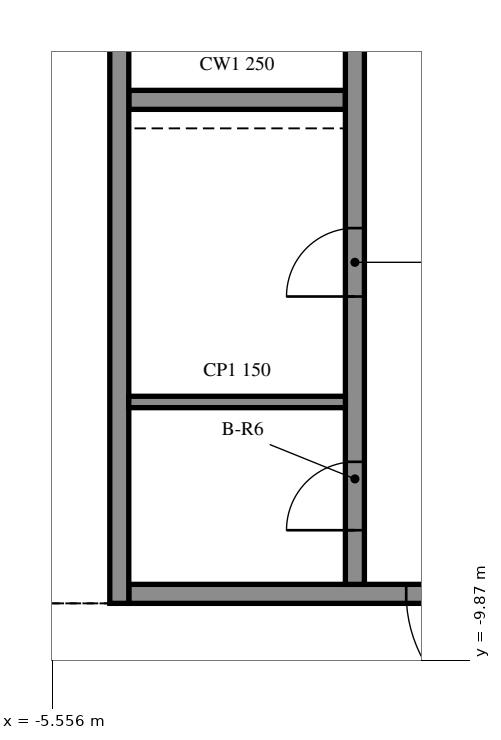
"""IFC4 building model, lengths in metres.
Left out: names, types, materials, properties, quantities, classifications, styles, units other than length and angle.
Written with IfcOpenShell. Run it as: python <this file> out.ifc"""

import sys

from ifc_helpers import new_model, si_unit, direction, frame, frame_2d, origin, place, context, subcontext, project, spatial, rectangle, extrude, element, fill, save


model = new_model("IFC4")
c1 = context("Model", 3, precision=1e-05, world=origin(), true_north=direction((0.0, 1.0)))
c2 = subcontext(c1, "Body", "Model", "MODEL_VIEW")
j1 = project(units=[si_unit("LENGTHUNIT", "METRE"), si_unit("PLANEANGLEUNIT", "RADIAN")], contexts=[c1])
p1 = place(None, origin())
s1 = spatial("IfcSite", under=j1, at=p1, CompositionType="ELEMENT")
p2 = place(p1, origin())
s2 = spatial("IfcBuilding", under=s1, at=p2, CompositionType="ELEMENT")
p3 = place(p2, frame((0.0, 0.0, 117.6)))
s3 = spatial("IfcBuildingStorey", under=s2, at=p3, CompositionType="ELEMENT", Elevation=117.6)
p4 = place(p3, frame((-4.675, 15.125, 0.0), z_axis=(0.0, 0.0, 1.0), x_axis=(0.0, -1.0, 0.0)))
e1 = element("IfcWall", 1, at=p4, inside=s3, PredefinedType="SOLIDWALL", context=c2, shape_type="SweptSolid", body=[
    extrude(rectangle(XDim=24.25, YDim=0.25, at=frame_2d((12.125, 0.0))), origin(), (0.0, 0.0, 1.0), 4.06),
])
p5 = place(p3, frame((4.55, -9.0, 0.0), z_axis=(0.0, 0.0, 1.0), x_axis=(-1.0, 0.0, 0.0)))
e2 = element("IfcWall", 2, at=p5, inside=s3, PredefinedType="SOLIDWALL", context=c2, shape_type="SweptSolid", body=[
    extrude(rectangle(XDim=9.1, YDim=0.25, at=frame_2d((4.55, 0.0))), origin(), (0.0, 0.0, 1.0), 4.06),
])
p6 = place(p5, frame((3.65, 0.0, 0.0)))
e3 = element("IfcOpeningElement", 3, at=p6, cuts=e2, PredefinedType="OPENING", context=c2, shape_type="SweptSolid", body=[
    extrude(rectangle(XDim=1.8, YDim=2.1, at=frame_2d((0.9, 1.05))), frame((0.0, 0.135, 0.0), z_axis=(0.0, -1.0, 0.0), x_axis=(1.0, 0.0, 0.0)), (0.0, 0.0, 1.0), 0.27),
])
p7 = place(p3, frame((-1.575, -8.875, 0.0), z_axis=(0.0, 0.0, 1.0), x_axis=(0.0, 1.0, 0.0)))
e4 = element("IfcWall", 4, at=p7, inside=s3, PredefinedType="SOLIDWALL", context=c2, shape_type="SweptSolid", body=[
    extrude(rectangle(XDim=23.75, YDim=0.25, at=frame_2d((11.875, 0.0))), origin(), (0.0, 0.0, 1.0), 4.06),
])
p8 = place(p7, frame((8.7, 0.0, 0.0)))
e5 = element("IfcOpeningElement", 5, at=p8, cuts=e4, PredefinedType="OPENING", context=c2, shape_type="SweptSolid", body=[
    extrude(rectangle(XDim=0.9, YDim=2.1, at=frame_2d((0.45, 1.05))), frame((0.0, 0.135, 0.0), z_axis=(0.0, -1.0, 0.0), x_axis=(1.0, 0.0, 0.0)), (0.0, 0.0, 1.0), 0.27),
])
p9 = place(p7, frame((14.15, 0.0, 0.0)))
e6 = element("IfcOpeningElement", 6, at=p9, cuts=e4, PredefinedType="OPENING", context=c2, shape_type="SweptSolid", body=[
    extrude(rectangle(XDim=0.9, YDim=2.1, at=frame_2d((0.45, 1.05))), frame((0.0, 0.135, 0.0), z_axis=(0.0, -1.0, 0.0), x_axis=(1.0, 0.0, 0.0)), (0.0, 0.0, 1.0), 0.27),
])
p10 = place(p7, frame((0.712, 0.0, 0.0)))
e7 = element("IfcOpeningElement", 7, at=p10, cuts=e4, PredefinedType="OPENING", context=c2, shape_type="SweptSolid", body=[
    extrude(rectangle(XDim=0.9, YDim=2.1, at=frame_2d((0.45, 1.05))), frame((0.0, 0.135, 0.0), z_axis=(0.0, -1.0, 0.0), x_axis=(1.0, 0.0, 0.0)), (0.0, 0.0, 1.0), 0.27),
])
p11 = place(p7, frame((3.788, 0.0, 0.0)))
e8 = element("IfcOpeningElement", 8, at=p11, cuts=e4, PredefinedType="OPENING", context=c2, shape_type="SweptSolid", body=[
    extrude(rectangle(XDim=0.9, YDim=2.1, at=frame_2d((0.45, 1.05))), frame((0.0, 0.135, 0.0), z_axis=(0.0, -1.0, 0.0), x_axis=(1.0, 0.0, 0.0)), (0.0, 0.0, 1.0), 0.27),
])
p12 = place(p7, frame((20.3, 0.0, 0.0)))
e9 = element("IfcOpeningElement", 9, at=p12, cuts=e4, PredefinedType="OPENING", context=c2, shape_type="SweptSolid", body=[
    extrude(rectangle(XDim=0.9, YDim=2.1, at=frame_2d((0.45, 1.05))), frame((0.0, 0.135, 0.0), z_axis=(0.0, -1.0, 0.0), x_axis=(1.0, 0.0, 0.0)), (0.0, 0.0, 1.0), 0.27),
])
p13 = place(p3, frame((-4.55, -2.5, 0.0), z_axis=(0.0, 0.0, 1.0), x_axis=(1.0, 0.0, 0.0)))
e10 = element("IfcWall", 10, at=p13, inside=s3, PredefinedType="SOLIDWALL", context=c2, shape_type="SweptSolid", body=[
    extrude(rectangle(XDim=2.85, YDim=0.25, at=frame_2d((1.425, 0.0))), origin(), (0.0, 0.0, 1.0), 4.06),
])
p14 = place(p3, frame((-4.55, -6.475, 0.0), z_axis=(0.0, 0.0, 1.0), x_axis=(1.0, 0.0, 0.0)))
e11 = element("IfcWall", 11, at=p14, inside=s3, PredefinedType="PARTITIONING", context=c2, shape_type="SweptSolid", body=[
    extrude(rectangle(XDim=2.85, YDim=0.15, at=frame_2d((1.425, 0.0))), origin(), (0.0, 0.0, 1.0), 4.06),
])
p15 = place(p6, origin())
e12 = element("IfcDoor", 12, at=p15, inside=s3, OperationType="DOUBLE_DOOR_SINGLE_SWING", PredefinedType="DOOR", context=c2, shape_type="SweptSolid", body=[
    extrude(rectangle(XDim=1.8, YDim=2.1, at=frame_2d((0.9, 1.05))), frame((0.0, 0.025, 0.0), z_axis=(0.0, -1.0, 0.0), x_axis=(1.0, 0.0, 0.0)), (0.0, 0.0, 1.0), 0.05),
])
fill(e3, e12)
p16 = place(p10, origin())
e13 = element("IfcDoor", 13, at=p16, inside=s3, OperationType="SINGLE_SWING_RIGHT", PredefinedType="DOOR", context=c2, shape_type="SweptSolid", body=[
    extrude(rectangle(XDim=0.9, YDim=2.1, at=frame_2d((0.45, 1.05))), frame((0.0, 0.025, 0.0), z_axis=(0.0, -1.0, 0.0), x_axis=(1.0, 0.0, 0.0)), (0.0, 0.0, 1.0), 0.05),
])
fill(e7, e13)
p17 = place(p11, origin())
e14 = element("IfcDoor", 14, at=p17, inside=s3, OperationType="SINGLE_SWING_LEFT", PredefinedType="DOOR", context=c2, shape_type="SweptSolid", body=[
    extrude(rectangle(XDim=0.9, YDim=2.1, at=frame_2d((0.45, 1.05))), frame((0.0, 0.025, 0.0), z_axis=(0.0, -1.0, 0.0), x_axis=(1.0, 0.0, 0.0)), (0.0, 0.0, 1.0), 0.05),
])
fill(e8, e14)
save(model, sys.argv[1])
